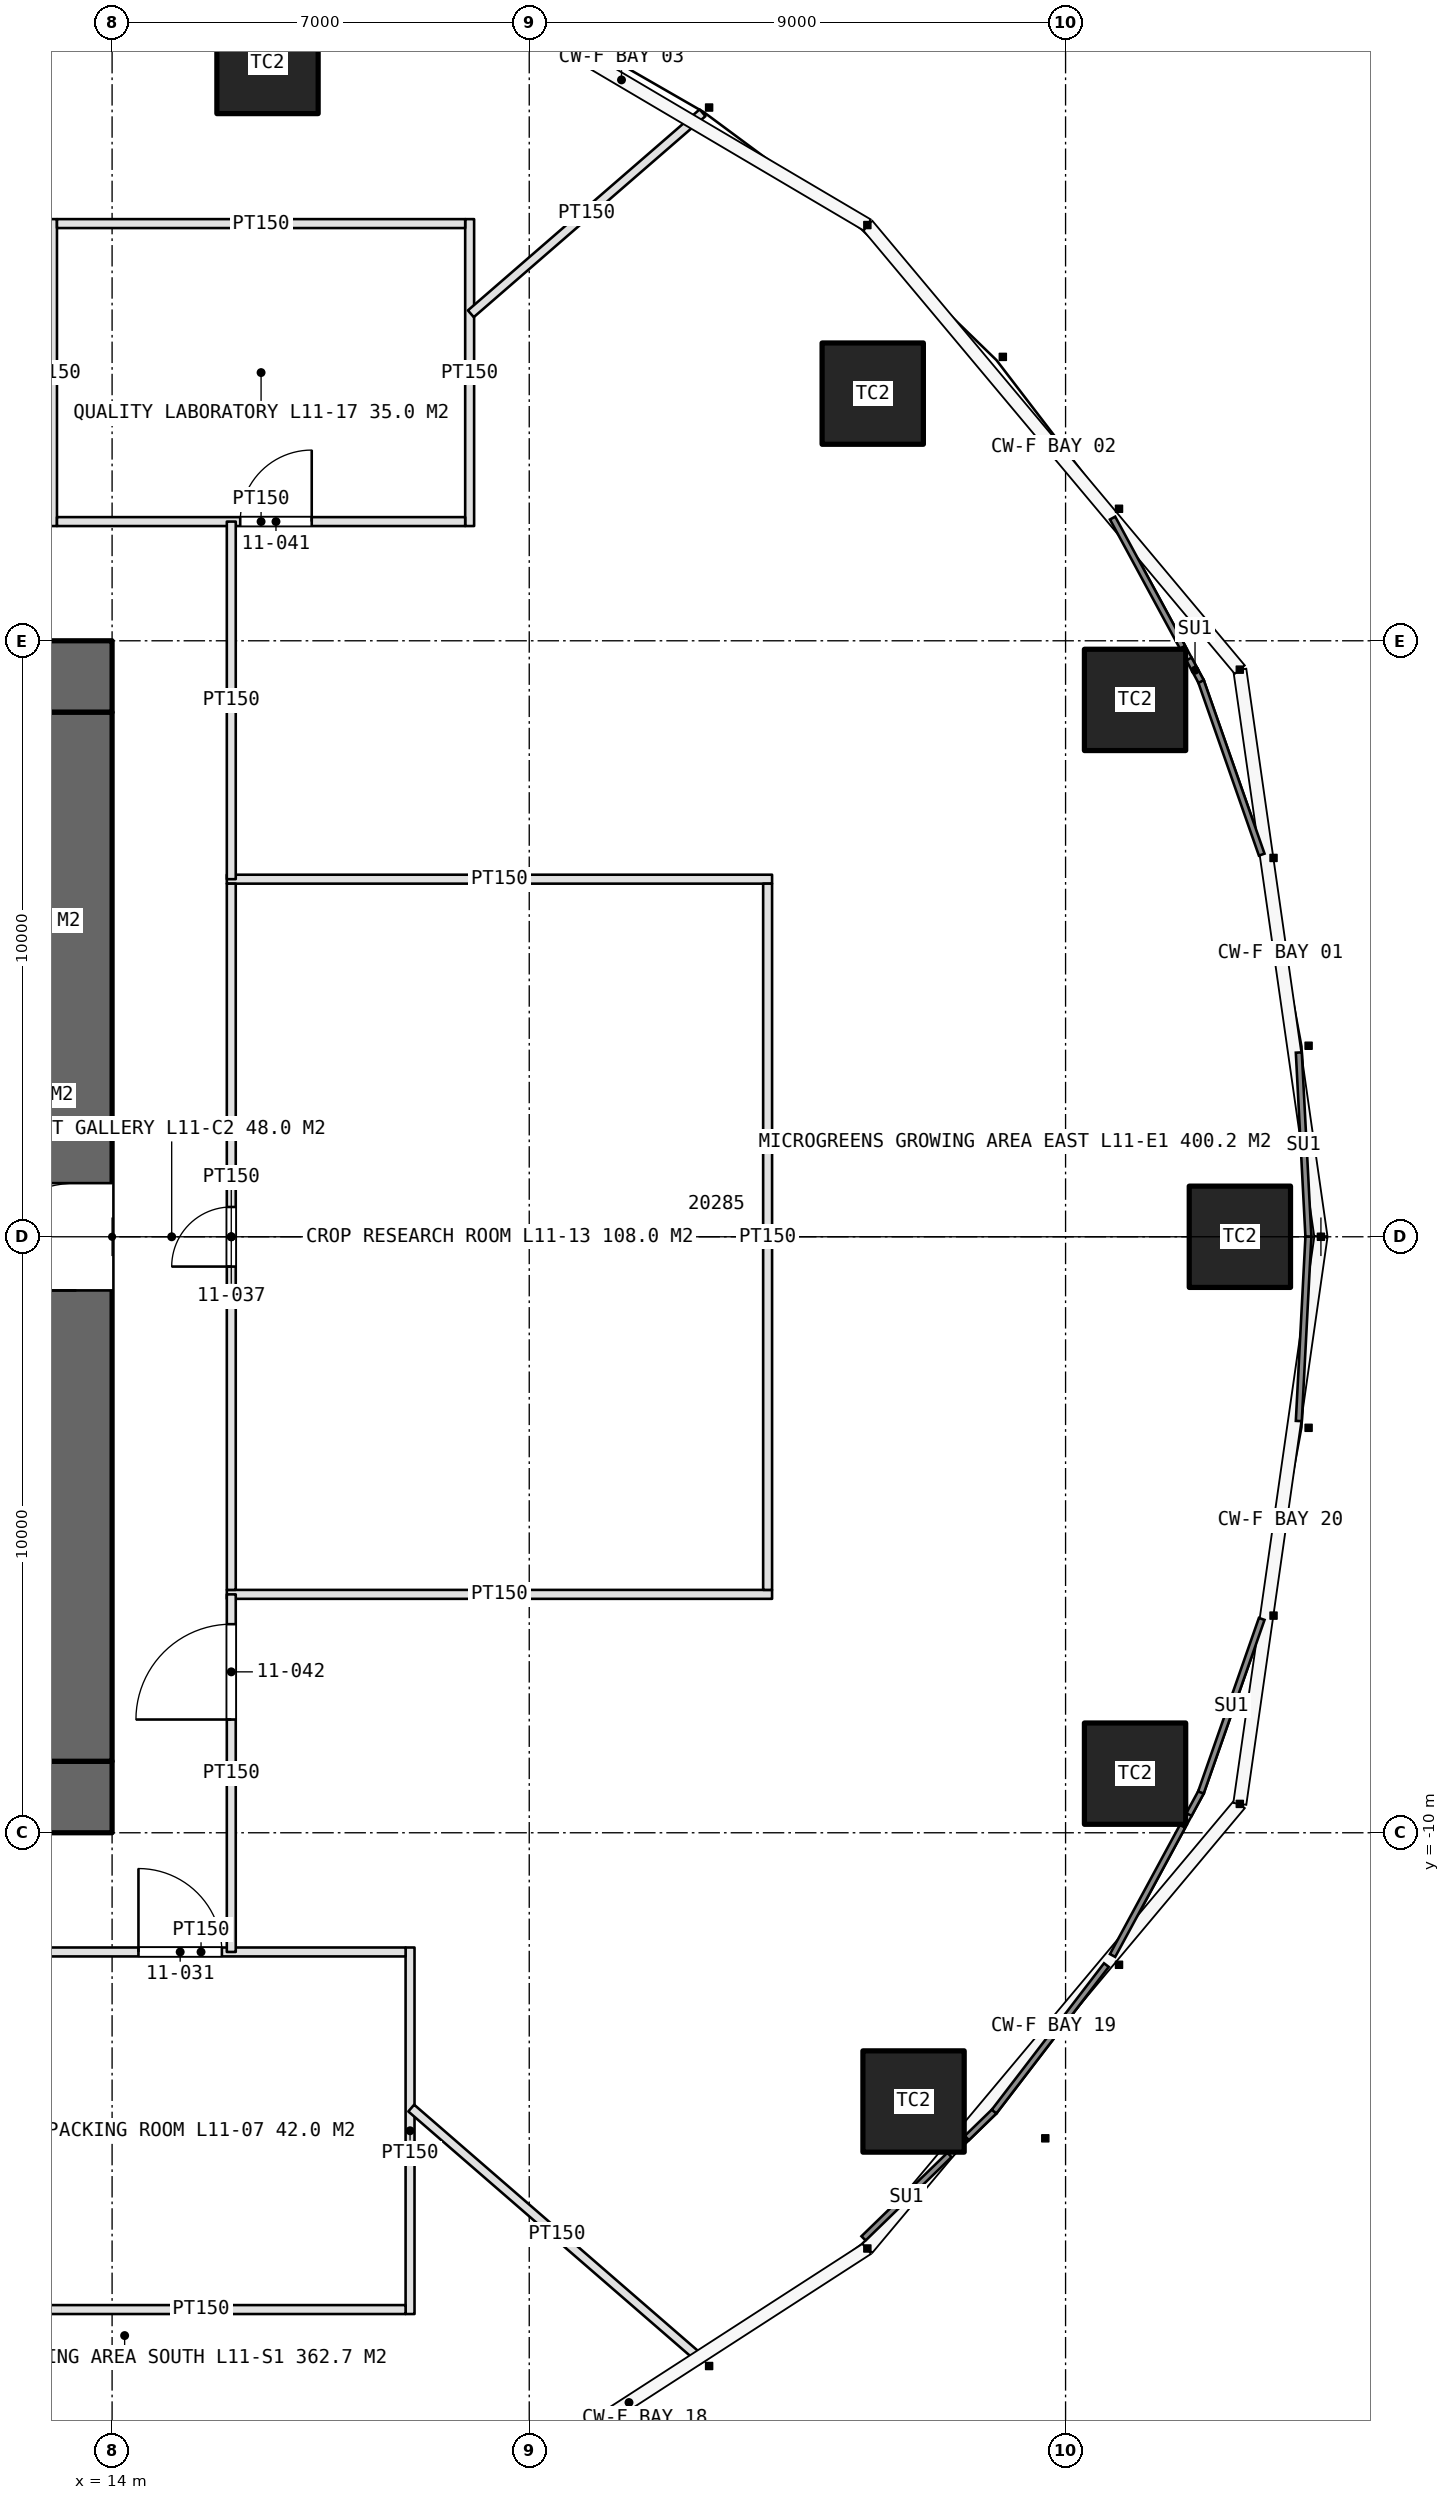
"""IFC4 building model, lengths in metres.
Left out: names, types, materials, properties, quantities, classifications, styles, units other than length and angle.
Written with IfcOpenShell. Run it as: python <this file> out.ifc"""

import sys

from ifc_helpers import new_model, si_unit, direction, frame, frame_2d, origin, origin_2d, place, context, subcontext, project, spatial, rectangle, extrude, element, fill, save


model = new_model("IFC4")
c1 = context("Model", 3, precision=1e-05, world=origin(), true_north=direction((0.0, 1.0)))
c2 = subcontext(c1, "Body", "Model", "MODEL_VIEW")
j1 = project(units=[si_unit("LENGTHUNIT", "METRE"), si_unit("PLANEANGLEUNIT", "RADIAN")], contexts=[c1])
p1 = place(None, origin())
s1 = spatial("IfcSite", under=j1, at=p1, CompositionType="ELEMENT")
p2 = place(p1, origin())
s2 = spatial("IfcBuilding", under=s1, at=p2, CompositionType="ELEMENT")
p3 = place(p2, frame((0.0, 0.0, 55.0)))
s3 = spatial("IfcBuildingStorey", under=s2, at=p3, CompositionType="ELEMENT", Elevation=55.0)
p4 = place(p3, frame((-14.0, -9.4, 0.0), z_axis=(0.0, 0.0, 1.0), x_axis=(1.0, 0.0, 0.0)))
e1 = element("IfcWall", 1, at=p4, inside=s3, PredefinedType="SHEAR", context=c2, shape_type="SweptSolid", body=[
    extrude(rectangle(XDim=28.0, YDim=1.2, at=frame_2d((14.0, 0.0))), origin(), (0.0, 0.0, 1.0), 5.0),
])
p5 = place(p4, frame((13.1, 0.0, 0.0)))
e2 = element("IfcOpeningElement", 2, at=p5, cuts=e1, PredefinedType="OPENING", context=c2, shape_type="SweptSolid", body=[
    extrude(rectangle(XDim=1.8, YDim=2.4, at=frame_2d((0.9, 1.2))), frame((0.0, 0.61, 0.0), z_axis=(0.0, -1.0, 0.0), x_axis=(1.0, 0.0, 0.0)), (0.0, 0.0, 1.0), 1.22),
])
p6 = place(p4, frame((22.9, 0.0, 0.0)))
e3 = element("IfcOpeningElement", 3, at=p6, cuts=e1, PredefinedType="OPENING", context=c2, shape_type="SweptSolid", body=[
    extrude(rectangle(XDim=2.2, YDim=2.7, at=frame_2d((1.1, 1.35))), frame((0.0, 0.61, 0.0), z_axis=(0.0, -1.0, 0.0), x_axis=(1.0, 0.0, 0.0)), (0.0, 0.0, 1.0), 1.22),
])
p7 = place(p3, frame((14.0, 9.4, 0.0), z_axis=(0.0, 0.0, 1.0), x_axis=(-1.0, 0.0, 0.0)))
e4 = element("IfcWall", 4, at=p7, inside=s3, PredefinedType="SHEAR", context=c2, shape_type="SweptSolid", body=[
    extrude(rectangle(XDim=28.0, YDim=1.2, at=frame_2d((14.0, 0.0))), origin(), (0.0, 0.0, 1.0), 5.0),
])
p8 = place(p7, frame((24.0, 0.0, 0.0)))
e5 = element("IfcOpeningElement", 5, at=p8, cuts=e4, PredefinedType="OPENING", context=c2, shape_type="SweptSolid", body=[
    extrude(rectangle(XDim=1.0, YDim=2.4, at=frame_2d((0.5, 1.2))), frame((0.0, 0.61, 0.0), z_axis=(0.0, -1.0, 0.0), x_axis=(1.0, 0.0, 0.0)), (0.0, 0.0, 1.0), 1.22),
])
p9 = place(p7, frame((13.1, 0.0, 0.0)))
e6 = element("IfcOpeningElement", 6, at=p9, cuts=e4, PredefinedType="OPENING", context=c2, shape_type="SweptSolid", body=[
    extrude(rectangle(XDim=1.8, YDim=2.4, at=frame_2d((0.9, 1.2))), frame((0.0, 0.61, 0.0), z_axis=(0.0, -1.0, 0.0), x_axis=(1.0, 0.0, 0.0)), (0.0, 0.0, 1.0), 1.22),
])
p10 = place(p3, frame((13.4, -8.8, 0.0), z_axis=(0.0, 0.0, 1.0), x_axis=(0.0, 1.0, 0.0)))
e7 = element("IfcWall", 7, at=p10, inside=s3, PredefinedType="SHEAR", context=c2, shape_type="SweptSolid", body=[
    extrude(rectangle(XDim=17.6, YDim=1.2, at=frame_2d((8.8, 0.0))), origin(), (0.0, 0.0, 1.0), 5.0),
])
p11 = place(p10, frame((7.9, 0.0, 0.0)))
e8 = element("IfcOpeningElement", 8, at=p11, cuts=e7, PredefinedType="OPENING", context=c2, shape_type="SweptSolid", body=[
    extrude(rectangle(XDim=1.8, YDim=2.4, at=frame_2d((0.9, 1.2))), frame((0.0, 0.61, 0.0), z_axis=(0.0, -1.0, 0.0), x_axis=(1.0, 0.0, 0.0)), (0.0, 0.0, 1.0), 1.22),
])
for number, where, z_axis, x_axis in (
    (9, (32.925, 0.0, 0.0), (0.0, 0.0, 1.0), (1.0, 0.0, 0.0)),
    (10, (31.166, 9.008, 0.0), (0.0, 0.0, 1.0), (1.0, 0.0, 0.0)),
    (11, (26.764, 14.147, 0.0), (0.0, 0.0, 1.0), (1.0, 0.0, 0.0)),
    (12, (16.608, 19.695, 0.0), (0.0, 0.0, 1.0), (1.0, 0.0, 0.0)),
    (13, (27.449, -14.509, 0.0), (0.0, 0.0, 1.0), (1.0, 0.0, 0.0)),
    (14, (31.166, -9.008, 0.0), (0.0, 0.0, 1.0), (1.0, 0.0, 0.0)),
):
    element("IfcColumn", number, at=place(p3, frame(where, z_axis=z_axis, x_axis=x_axis)), inside=s3, PredefinedType="COLUMN", context=c2, shape_type="SweptSolid", body=[
        extrude(rectangle(XDim=1.7, YDim=1.7, at=origin_2d()), origin(), (0.0, 0.0, 1.0), 5.0),
    ])
p12 = place(p3, frame((19.0, -11.925, 0.0), z_axis=(0.0, 0.0, 1.0), x_axis=(0.0, -1.0, 0.0)))
e15 = element("IfcWall", 15, at=p12, inside=s3, PredefinedType="PARTITIONING", context=c2, shape_type="SweptSolid", body=[
    extrude(rectangle(XDim=6.15, YDim=0.15, at=frame_2d((3.075, 0.0))), origin(), (0.0, 0.0, 1.0), 3.6),
])
p13 = place(p3, frame((12.06, -12.0, 0.0), z_axis=(0.0, 0.0, 1.0), x_axis=(1.0, 0.0, 0.0)))
e16 = element("IfcWall", 16, at=p13, inside=s3, PredefinedType="PARTITIONING", context=c2, shape_type="SweptSolid", body=[
    extrude(rectangle(XDim=6.865, YDim=0.15, at=frame_2d((3.433, 0.0))), origin(), (0.0, 0.0, 1.0), 3.6),
])
p14 = place(p13, frame((2.383, 0.0, 0.0)))
e17 = element("IfcOpeningElement", 17, at=p14, cuts=e16, PredefinedType="OPENING", context=c2, shape_type="SweptSolid", body=[
    extrude(rectangle(XDim=1.4, YDim=2.4, at=frame_2d((0.7, 1.2))), frame((0.0, 0.085, 0.0), z_axis=(0.0, -1.0, 0.0), x_axis=(1.0, 0.0, 0.0)), (0.0, 0.0, 1.0), 0.17),
])
p15 = place(p3, frame((12.06, -18.0, 0.0), z_axis=(0.0, 0.0, 1.0), x_axis=(1.0, 0.0, 0.0)))
e18 = element("IfcWall", 18, at=p15, inside=s3, PredefinedType="PARTITIONING", context=c2, shape_type="SweptSolid", body=[
    extrude(rectangle(XDim=6.865, YDim=0.15, at=frame_2d((3.433, 0.0))), origin(), (0.0, 0.0, 1.0), 3.6),
])
for number, where, z_axis, x_axis in (
    (19, (15.925, -6.0, 0.0), (0.0, 0.0, 1.0), (1.0, 0.0, 0.0)),
    (20, (15.925, 6.0, 0.0), (0.0, 0.0, 1.0), (1.0, 0.0, 0.0)),
):
    element("IfcWall", number, at=place(p3, frame(where, z_axis=z_axis, x_axis=x_axis)), inside=s3, PredefinedType="PARTITIONING", context=c2, shape_type="SweptSolid", body=[
        extrude(rectangle(XDim=9.15, YDim=0.15, at=frame_2d((4.575, 0.0))), origin(), (0.0, 0.0, 1.0), 3.6),
    ])
p16 = place(p3, frame((16.0, -5.925, 0.0), z_axis=(0.0, 0.0, 1.0), x_axis=(0.0, 1.0, 0.0)))
e21 = element("IfcWall", 21, at=p16, inside=s3, PredefinedType="PARTITIONING", context=c2, shape_type="SweptSolid", body=[
    extrude(rectangle(XDim=11.85, YDim=0.15, at=frame_2d((5.925, 0.0))), origin(), (0.0, 0.0, 1.0), 3.6),
])
p17 = place(p16, frame((5.425, 0.0, 0.0)))
e22 = element("IfcOpeningElement", 22, at=p17, cuts=e21, PredefinedType="OPENING", context=c2, shape_type="SweptSolid", body=[
    extrude(rectangle(XDim=1.0, YDim=2.2, at=frame_2d((0.5, 1.1))), frame((0.0, 0.085, 0.0), z_axis=(0.0, -1.0, 0.0), x_axis=(1.0, 0.0, 0.0)), (0.0, 0.0, 1.0), 0.17),
])
p18 = place(p3, frame((25.0, -5.925, 0.0), z_axis=(0.0, 0.0, 1.0), x_axis=(0.0, 1.0, 0.0)))
e23 = element("IfcWall", 23, at=p18, inside=s3, PredefinedType="PARTITIONING", context=c2, shape_type="SweptSolid", body=[
    extrude(rectangle(XDim=11.85, YDim=0.15, at=frame_2d((5.925, 0.0))), origin(), (0.0, 0.0, 1.0), 3.6),
])
for number, where, z_axis, x_axis in (
    (24, (13.0, 11.925, 0.0), (0.0, 0.0, 1.0), (0.0, 1.0, 0.0)),
    (25, (20.0, 11.925, 0.0), (0.0, 0.0, 1.0), (0.0, 1.0, 0.0)),
):
    element("IfcWall", number, at=place(p3, frame(where, z_axis=z_axis, x_axis=x_axis)), inside=s3, PredefinedType="PARTITIONING", context=c2, shape_type="SweptSolid", body=[
        extrude(rectangle(XDim=5.15, YDim=0.15, at=frame_2d((2.575, 0.0))), origin(), (0.0, 0.0, 1.0), 3.6),
    ])
p19 = place(p3, frame((13.075, 12.0, 0.0), z_axis=(0.0, 0.0, 1.0), x_axis=(1.0, 0.0, 0.0)))
e26 = element("IfcWall", 26, at=p19, inside=s3, PredefinedType="PARTITIONING", context=c2, shape_type="SweptSolid", body=[
    extrude(rectangle(XDim=6.85, YDim=0.15, at=frame_2d((3.425, 0.0))), origin(), (0.0, 0.0, 1.0), 3.6),
])
p20 = place(p19, frame((3.075, 0.0, 0.0)))
e27 = element("IfcOpeningElement", 27, at=p20, cuts=e26, PredefinedType="OPENING", context=c2, shape_type="SweptSolid", body=[
    extrude(rectangle(XDim=1.2, YDim=2.3, at=frame_2d((0.6, 1.15))), frame((0.0, 0.085, 0.0), z_axis=(0.0, -1.0, 0.0), x_axis=(1.0, 0.0, 0.0)), (0.0, 0.0, 1.0), 0.17),
])
p21 = place(p3, frame((13.075, 17.0, 0.0), z_axis=(0.0, 0.0, 1.0), x_axis=(1.0, 0.0, 0.0)))
e28 = element("IfcWall", 28, at=p21, inside=s3, PredefinedType="PARTITIONING", context=c2, shape_type="SweptSolid", body=[
    extrude(rectangle(XDim=6.85, YDim=0.15, at=frame_2d((3.425, 0.0))), origin(), (0.0, 0.0, 1.0), 3.6),
])
p22 = place(p3, frame((19.02, -14.619, 0.0), z_axis=(0.0, 0.0, 1.0), x_axis=(0.755435065004, -0.65522352107, 0.0)))
e29 = element("IfcWall", 29, at=p22, inside=s3, PredefinedType="PARTITIONING", context=c2, shape_type="SweptSolid", body=[
    extrude(rectangle(XDim=6.471, YDim=0.15, at=frame_2d((3.235, 0.0))), origin(), (0.0, 0.0, 1.0), 3.6),
])
p23 = place(p3, frame((20.02, 15.487, 0.0), z_axis=(0.0, 0.0, 1.0), x_axis=(0.755443308786, 0.655214016342, 0.0)))
e30 = element("IfcWall", 30, at=p23, inside=s3, PredefinedType="PARTITIONING", context=c2, shape_type="SweptSolid", body=[
    extrude(rectangle(XDim=5.147, YDim=0.15, at=frame_2d((2.573, 0.0))), origin(), (0.0, 0.0, 1.0), 3.6),
])
p24 = place(p3, frame((16.0, -12.0, 0.0), z_axis=(0.0, 0.0, 1.0), x_axis=(0.0, 1.0, 0.0)))
e31 = element("IfcWall", 31, at=p24, inside=s3, PredefinedType="PARTITIONING", context=c2, shape_type="SweptSolid", body=[
    extrude(rectangle(XDim=6.0, YDim=0.15, at=frame_2d((3.0, 0.0))), origin(), (0.0, 0.0, 1.0), 3.6),
])
p25 = place(p24, frame((3.9, 0.0, 0.0)))
e32 = element("IfcOpeningElement", 32, at=p25, cuts=e31, PredefinedType="OPENING", context=c2, shape_type="SweptSolid", body=[
    extrude(rectangle(XDim=1.6, YDim=2.4, at=frame_2d((0.8, 1.2))), frame((0.0, 0.085, 0.0), z_axis=(0.0, -1.0, 0.0), x_axis=(1.0, 0.0, 0.0)), (0.0, 0.0, 1.0), 0.17),
])
p26 = place(p3, frame((16.0, 6.0, 0.0), z_axis=(0.0, 0.0, 1.0), x_axis=(0.0, 1.0, 0.0)))
e33 = element("IfcWall", 33, at=p26, inside=s3, PredefinedType="PARTITIONING", context=c2, shape_type="SweptSolid", body=[
    extrude(rectangle(XDim=6.0, YDim=0.15, at=frame_2d((3.0, 0.0))), origin(), (0.0, 0.0, 1.0), 3.6),
])
p27 = place(p11, origin())
e34 = element("IfcDoor", 34, at=p27, inside=s3, OperationType="DOUBLE_DOOR_SINGLE_SWING", PredefinedType="DOOR", context=c2, shape_type="SweptSolid", body=[
    extrude(rectangle(XDim=1.8, YDim=2.4, at=frame_2d((0.9, 1.2))), frame((0.0, 0.025, 0.0), z_axis=(0.0, -1.0, 0.0), x_axis=(1.0, 0.0, 0.0)), (0.0, 0.0, 1.0), 0.05),
])
fill(e8, e34)
p28 = place(p14, origin())
e35 = element("IfcDoor", 35, at=p28, inside=s3, OperationType="DOUBLE_DOOR_DOUBLE_SWING", PredefinedType="DOOR", context=c2, shape_type="SweptSolid", body=[
    extrude(rectangle(XDim=1.4, YDim=2.4, at=frame_2d((0.7, 1.2))), frame((0.0, 0.025, 0.0), z_axis=(0.0, -1.0, 0.0), x_axis=(1.0, 0.0, 0.0)), (0.0, 0.0, 1.0), 0.05),
])
fill(e17, e35)
p29 = place(p17, origin())
e36 = element("IfcDoor", 36, at=p29, inside=s3, OperationType="SINGLE_SWING_LEFT", PredefinedType="DOOR", context=c2, shape_type="SweptSolid", body=[
    extrude(rectangle(XDim=1.0, YDim=2.2, at=frame_2d((0.5, 1.1))), frame((0.0, 0.025, 0.0), z_axis=(0.0, -1.0, 0.0), x_axis=(1.0, 0.0, 0.0)), (0.0, 0.0, 1.0), 0.05),
])
fill(e22, e36)
p30 = place(p20, origin())
e37 = element("IfcDoor", 37, at=p30, inside=s3, OperationType="SINGLE_SWING_RIGHT", PredefinedType="DOOR", context=c2, shape_type="SweptSolid", body=[
    extrude(rectangle(XDim=1.2, YDim=2.3, at=frame_2d((0.6, 1.15))), frame((0.0, 0.025, 0.0), z_axis=(0.0, -1.0, 0.0), x_axis=(1.0, 0.0, 0.0)), (0.0, 0.0, 1.0), 0.05),
])
fill(e27, e37)
p31 = place(p25, origin())
e38 = element("IfcDoor", 38, at=p31, inside=s3, OperationType="DOUBLE_DOOR_SINGLE_SWING", PredefinedType="DOOR", context=c2, shape_type="SweptSolid", body=[
    extrude(rectangle(XDim=1.6, YDim=2.4, at=frame_2d((0.8, 1.2))), frame((0.0, 0.025, 0.0), z_axis=(0.0, -1.0, 0.0), x_axis=(1.0, 0.0, 0.0)), (0.0, 0.0, 1.0), 0.05),
])
fill(e32, e38)
save(model, sys.argv[1])
